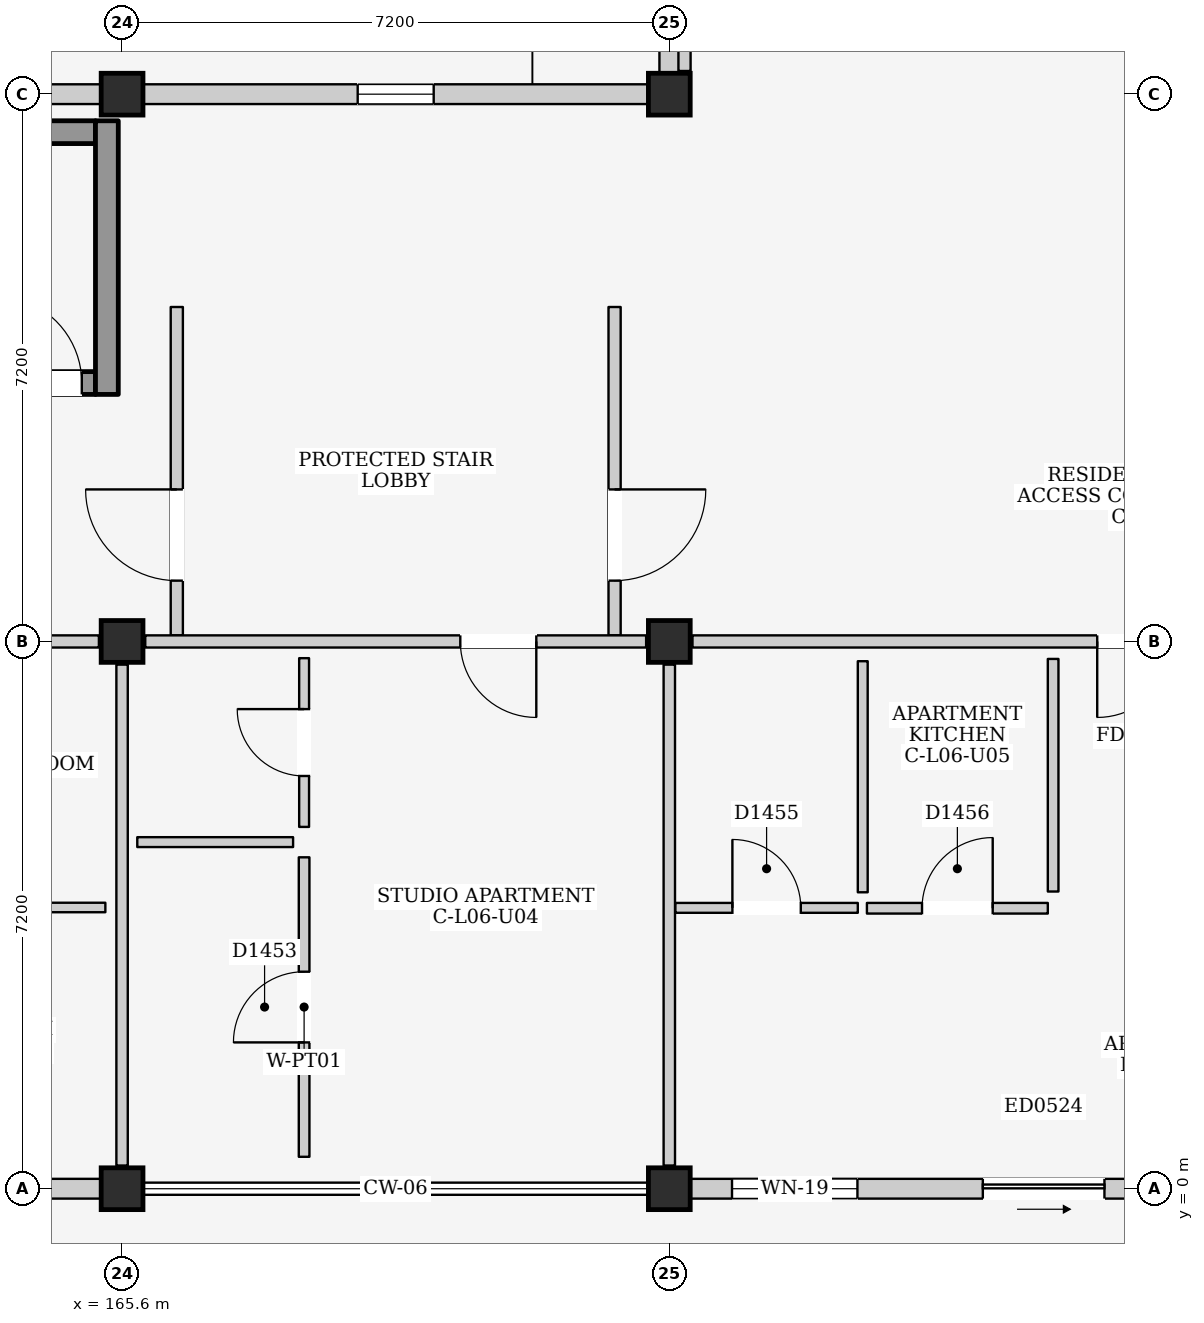
"""IFC4 building model, lengths in metres.
Left out: names, types, materials, properties, quantities, classifications, styles, units other than length and angle.
Written with IfcOpenShell. Run it as: python <this file> out.ifc"""

import sys

from ifc_helpers import new_model, si_unit, direction, frame, frame_2d, origin, origin_2d, place, context, subcontext, project, spatial, rectangle, extrude, element, fill, save


model = new_model("IFC4")
c1 = context("Model", 3, precision=1e-05, world=origin(), true_north=direction((0.0, 1.0)))
c2 = subcontext(c1, "Body", "Model", "MODEL_VIEW")
j1 = project(units=[si_unit("LENGTHUNIT", "METRE"), si_unit("PLANEANGLEUNIT", "RADIAN")], contexts=[c1])
p1 = place(None, origin())
s1 = spatial("IfcSite", under=j1, at=p1, CompositionType="ELEMENT")
p2 = place(p1, origin())
s2 = spatial("IfcBuilding", under=s1, at=p2, CompositionType="ELEMENT")
p3 = place(p2, frame((0.0, 0.0, 21.9)))
s3 = spatial("IfcBuildingStorey", under=s2, at=p3, CompositionType="ELEMENT", Elevation=21.9)
for number, where, z_axis, x_axis in (
    (1, (165.6, 0.0, 0.0), (0.0, 0.0, 1.0), (1.0, 0.0, 0.0)),
    (2, (165.6, 7.2, 0.0), (0.0, 0.0, 1.0), (1.0, 0.0, 0.0)),
    (3, (165.6, 14.4, 0.0), (0.0, 0.0, 1.0), (1.0, 0.0, 0.0)),
    (4, (172.8, 0.0, 0.0), (0.0, 0.0, 1.0), (1.0, 0.0, 0.0)),
    (5, (172.8, 7.2, 0.0), (0.0, 0.0, 1.0), (1.0, 0.0, 0.0)),
    (6, (172.8, 14.4, 0.0), (0.0, 0.0, 1.0), (1.0, 0.0, 0.0)),
):
    element("IfcColumn", number, at=place(p3, frame(where, z_axis=z_axis, x_axis=x_axis)), inside=s3, PredefinedType="COLUMN", context=c2, shape_type="SweptSolid", body=[
        extrude(rectangle(XDim=0.55, YDim=0.55, at=origin_2d()), origin(), (0.0, 0.0, 1.0), 3.2),
    ])
p4 = place(p3, frame((158.675, 0.0, 0.0), z_axis=(0.0, 0.0, 1.0), x_axis=(1.0, 0.0, 0.0)))
e7 = element("IfcWall", 7, at=p4, inside=s3, PredefinedType="ELEMENTEDWALL", context=c2, shape_type="SweptSolid", body=[
    extrude(rectangle(XDim=6.65, YDim=0.26, at=frame_2d((3.325, 0.0))), origin(), (0.0, 0.0, 1.0), 2.515),
])
p5 = place(p4, frame((3.85, 0.0, 0.0)))
e8 = element("IfcOpeningElement", 8, at=p5, cuts=e7, PredefinedType="OPENING", context=c2, shape_type="SweptSolid", body=[
    extrude(rectangle(XDim=1.4, YDim=2.1, at=frame_2d((0.7, 1.05))), frame((0.0, 0.145, 0.0), z_axis=(0.0, -1.0, 0.0), x_axis=(1.0, 0.0, 0.0)), (0.0, 0.0, 1.0), 0.29),
])
p6 = place(p4, frame((0.55, 0.0, 0.9)))
e9 = element("IfcOpeningElement", 9, at=p6, cuts=e7, PredefinedType="OPENING", context=c2, shape_type="SweptSolid", body=[
    extrude(rectangle(XDim=1.25, YDim=1.3, at=frame_2d((0.625, 0.65))), frame((0.0, 0.145, 0.0), z_axis=(0.0, -1.0, 0.0), x_axis=(1.0, 0.0, 0.0)), (0.0, 0.0, 1.0), 0.29),
])
p7 = place(p3, frame((158.675, 14.4, 0.0), z_axis=(0.0, 0.0, 1.0), x_axis=(1.0, 0.0, 0.0)))
e10 = element("IfcWall", 10, at=p7, inside=s3, PredefinedType="ELEMENTEDWALL", context=c2, shape_type="SweptSolid", body=[
    extrude(rectangle(XDim=6.65, YDim=0.26, at=frame_2d((3.325, 0.0))), origin(), (0.0, 0.0, 1.0), 2.365),
])
p8 = place(p7, frame((2.825, 0.0, 1.2)))
e11 = element("IfcOpeningElement", 11, at=p8, cuts=e10, PredefinedType="OPENING", context=c2, shape_type="SweptSolid", body=[
    extrude(rectangle(XDim=1.0, YDim=0.9, at=frame_2d((0.5, 0.45))), frame((0.0, 0.145, 0.0), z_axis=(0.0, -1.0, 0.0), x_axis=(1.0, 0.0, 0.0)), (0.0, 0.0, 1.0), 0.29),
])
p9 = place(p3, frame((165.875, 14.4, 0.0), z_axis=(0.0, 0.0, 1.0), x_axis=(1.0, 0.0, 0.0)))
e12 = element("IfcWall", 12, at=p9, inside=s3, PredefinedType="ELEMENTEDWALL", context=c2, shape_type="SweptSolid", body=[
    extrude(rectangle(XDim=6.65, YDim=0.26, at=frame_2d((3.325, 0.0))), origin(), (0.0, 0.0, 1.0), 2.365),
])
p10 = place(p9, frame((2.825, 0.0, 1.2)))
e13 = element("IfcOpeningElement", 13, at=p10, cuts=e12, PredefinedType="OPENING", context=c2, shape_type="SweptSolid", body=[
    extrude(rectangle(XDim=1.0, YDim=0.9, at=frame_2d((0.5, 0.45))), frame((0.0, 0.145, 0.0), z_axis=(0.0, -1.0, 0.0), x_axis=(1.0, 0.0, 0.0)), (0.0, 0.0, 1.0), 0.29),
])
p11 = place(p3, frame((173.075, 0.0, 0.0), z_axis=(0.0, 0.0, 1.0), x_axis=(1.0, 0.0, 0.0)))
e14 = element("IfcWall", 14, at=p11, inside=s3, PredefinedType="ELEMENTEDWALL", context=c2, shape_type="SweptSolid", body=[
    extrude(rectangle(XDim=6.65, YDim=0.26, at=frame_2d((3.325, 0.0))), origin(), (0.0, 0.0, 1.0), 2.515),
])
p12 = place(p11, frame((3.85, 0.0, 0.0)))
e15 = element("IfcOpeningElement", 15, at=p12, cuts=e14, PredefinedType="OPENING", context=c2, shape_type="SweptSolid", body=[
    extrude(rectangle(XDim=1.6, YDim=2.12, at=frame_2d((0.8, 1.06))), frame((0.0, 0.145, 0.0), z_axis=(0.0, -1.0, 0.0), x_axis=(1.0, 0.0, 0.0)), (0.0, 0.0, 1.0), 0.29),
])
p13 = place(p11, frame((0.55, 0.0, 0.9)))
e16 = element("IfcOpeningElement", 16, at=p13, cuts=e14, PredefinedType="OPENING", context=c2, shape_type="SweptSolid", body=[
    extrude(rectangle(XDim=1.65, YDim=1.35, at=frame_2d((0.825, 0.675))), frame((0.0, 0.145, 0.0), z_axis=(0.0, -1.0, 0.0), x_axis=(1.0, 0.0, 0.0)), (0.0, 0.0, 1.0), 0.29),
])
p14 = place(p3, frame((172.8, 14.675, 0.0), z_axis=(0.0, 0.0, 1.0), x_axis=(0.0, 1.0, 0.0)))
e17 = element("IfcWall", 17, at=p14, inside=s3, PredefinedType="ELEMENTEDWALL", context=c2, shape_type="SweptSolid", body=[
    extrude(rectangle(XDim=6.65, YDim=0.26, at=frame_2d((3.325, 0.0))), origin(), (0.0, 0.0, 1.0), 2.465),
])
p15 = place(p14, frame((2.5, 0.0, 0.0)))
e18 = element("IfcOpeningElement", 18, at=p15, cuts=e17, PredefinedType="OPENING", context=c2, shape_type="SweptSolid", body=[
    extrude(rectangle(XDim=1.4, YDim=2.1, at=frame_2d((0.7, 1.05))), frame((0.0, 0.145, 0.0), z_axis=(0.0, -1.0, 0.0), x_axis=(1.0, 0.0, 0.0)), (0.0, 0.0, 1.0), 0.29),
])
p16 = place(p3, frame((158.75, 10.6, 0.0), z_axis=(0.0, 0.0, 1.0), x_axis=(1.0, 0.0, 0.0)))
e19 = element("IfcWall", 19, at=p16, inside=s3, PredefinedType="SHEAR", context=c2, shape_type="SweptSolid", body=[
    extrude(rectangle(XDim=6.5, YDim=0.3, at=frame_2d((3.25, 0.0))), origin(), (0.0, 0.0, 1.0), 2.98),
])
p17 = place(p16, frame((5.17, 0.0, 0.0)))
e20 = element("IfcOpeningElement", 20, at=p17, cuts=e19, PredefinedType="OPENING", context=c2, shape_type="SweptSolid", body=[
    extrude(rectangle(XDim=1.15, YDim=2.2, at=frame_2d((0.575, 1.1))), frame((0.0, 0.165, 0.0), z_axis=(0.0, -1.0, 0.0), x_axis=(1.0, 0.0, 0.0)), (0.0, 0.0, 1.0), 0.33),
])
p18 = place(p3, frame((158.75, 13.9, 0.0), z_axis=(0.0, 0.0, 1.0), x_axis=(1.0, 0.0, 0.0)))
e21 = element("IfcWall", 21, at=p18, inside=s3, PredefinedType="SHEAR", context=c2, shape_type="SweptSolid", body=[
    extrude(rectangle(XDim=6.5, YDim=0.3, at=frame_2d((3.25, 0.0))), origin(), (0.0, 0.0, 1.0), 2.98),
])
p19 = place(p3, frame((165.4, 10.45, 0.0), z_axis=(0.0, 0.0, 1.0), x_axis=(0.0, 1.0, 0.0)))
e22 = element("IfcWall", 22, at=p19, inside=s3, PredefinedType="SHEAR", context=c2, shape_type="SweptSolid", body=[
    extrude(rectangle(XDim=3.6, YDim=0.3, at=frame_2d((1.8, 0.0))), origin(), (0.0, 0.0, 1.0), 2.98),
])
p20 = place(p3, frame((166.32, 7.28, 0.0), z_axis=(0.0, 0.0, 1.0), x_axis=(0.0, 1.0, 0.0)))
e23 = element("IfcWall", 23, at=p20, inside=s3, PredefinedType="PARTITIONING", context=c2, shape_type="SweptSolid", body=[
    extrude(rectangle(XDim=4.32, YDim=0.16, at=frame_2d((2.16, 0.0))), origin(), (0.0, 0.0, 1.0), 2.98),
])
p21 = place(p20, frame((0.72, 0.0, 0.0)))
e24 = element("IfcOpeningElement", 24, at=p21, cuts=e23, PredefinedType="OPENING", context=c2, shape_type="SweptSolid", body=[
    extrude(rectangle(XDim=1.2, YDim=2.2, at=frame_2d((0.6, 1.1))), frame((0.0, 0.095, 0.0), z_axis=(0.0, -1.0, 0.0), x_axis=(1.0, 0.0, 0.0)), (0.0, 0.0, 1.0), 0.19),
])
p22 = place(p3, frame((172.08, 7.28, 0.0), z_axis=(0.0, 0.0, 1.0), x_axis=(0.0, 1.0, 0.0)))
e25 = element("IfcWall", 25, at=p22, inside=s3, PredefinedType="PARTITIONING", context=c2, shape_type="SweptSolid", body=[
    extrude(rectangle(XDim=4.32, YDim=0.16, at=frame_2d((2.16, 0.0))), origin(), (0.0, 0.0, 1.0), 2.98),
])
p23 = place(p22, frame((0.72, 0.0, 0.0)))
e26 = element("IfcOpeningElement", 26, at=p23, cuts=e25, PredefinedType="OPENING", context=c2, shape_type="SweptSolid", body=[
    extrude(rectangle(XDim=1.2, YDim=2.2, at=frame_2d((0.6, 1.1))), frame((0.0, 0.095, 0.0), z_axis=(0.0, -1.0, 0.0), x_axis=(1.0, 0.0, 0.0)), (0.0, 0.0, 1.0), 0.19),
])
p24 = place(p3, frame((158.705, 7.2, 0.0), z_axis=(0.0, 0.0, 1.0), x_axis=(1.0, 0.0, 0.0)))
e27 = element("IfcWall", 27, at=p24, inside=s3, PredefinedType="PARTITIONING", context=c2, shape_type="SweptSolid", body=[
    extrude(rectangle(XDim=6.59, YDim=0.16, at=frame_2d((3.295, 0.0))), origin(), (0.0, 0.0, 1.0), 2.365),
])
p25 = place(p3, frame((165.6, 0.305, 0.0), z_axis=(0.0, 0.0, 1.0), x_axis=(0.0, 1.0, 0.0)))
e28 = element("IfcWall", 28, at=p25, inside=s3, PredefinedType="PARTITIONING", context=c2, shape_type="SweptSolid", body=[
    extrude(rectangle(XDim=6.59, YDim=0.15, at=frame_2d((3.295, 0.0))), origin(), (0.0, 0.0, 1.0), 2.465),
])
p26 = place(p3, frame((161.32, 3.7, 0.0), z_axis=(0.0, 0.0, 1.0), x_axis=(1.0, 0.0, 0.0)))
e29 = element("IfcWall", 29, at=p26, inside=s3, PredefinedType="PARTITIONING", context=c2, shape_type="SweptSolid", body=[
    extrude(rectangle(XDim=4.06, YDim=0.125, at=frame_2d((2.03, 0.0))), origin(), (0.0, 0.0, 1.0), 2.98),
])
p27 = place(p3, frame((165.905, 7.2, 0.0), z_axis=(0.0, 0.0, 1.0), x_axis=(1.0, 0.0, 0.0)))
e30 = element("IfcWall", 30, at=p27, inside=s3, PredefinedType="PARTITIONING", context=c2, shape_type="SweptSolid", body=[
    extrude(rectangle(XDim=6.59, YDim=0.16, at=frame_2d((3.295, 0.0))), origin(), (0.0, 0.0, 1.0), 2.365),
])
p28 = place(p27, frame((4.145, 0.0, 0.0)))
e31 = element("IfcOpeningElement", 31, at=p28, cuts=e30, PredefinedType="OPENING", context=c2, shape_type="SweptSolid", body=[
    extrude(rectangle(XDim=1.0, YDim=2.15, at=frame_2d((0.5, 1.075))), frame((0.0, 0.095, 0.0), z_axis=(0.0, -1.0, 0.0), x_axis=(1.0, 0.0, 0.0)), (0.0, 0.0, 1.0), 0.19),
])
p29 = place(p3, frame((172.8, 0.305, 0.0), z_axis=(0.0, 0.0, 1.0), x_axis=(0.0, 1.0, 0.0)))
e32 = element("IfcWall", 32, at=p29, inside=s3, PredefinedType="PARTITIONING", context=c2, shape_type="SweptSolid", body=[
    extrude(rectangle(XDim=6.59, YDim=0.15, at=frame_2d((3.295, 0.0))), origin(), (0.0, 0.0, 1.0), 2.465),
])
p30 = place(p3, frame((165.8, 4.56, 0.0), z_axis=(0.0, 0.0, 1.0), x_axis=(1.0, 0.0, 0.0)))
e33 = element("IfcWall", 33, at=p30, inside=s3, PredefinedType="PARTITIONING", context=c2, shape_type="SweptSolid", body=[
    extrude(rectangle(XDim=2.05, YDim=0.13, at=frame_2d((1.025, 0.0))), origin(), (0.0, 0.0, 1.0), 2.98),
])
p31 = place(p3, frame((167.995, 4.76, 0.0), z_axis=(0.0, 0.0, 1.0), x_axis=(0.0, 1.0, 0.0)))
e34 = element("IfcWall", 34, at=p31, inside=s3, PredefinedType="PARTITIONING", context=c2, shape_type="SweptSolid", body=[
    extrude(rectangle(XDim=2.22, YDim=0.13, at=frame_2d((1.11, 0.0))), origin(), (0.0, 0.0, 1.0), 2.98),
])
p32 = place(p31, frame((0.67, 0.0, 0.0)))
e35 = element("IfcOpeningElement", 35, at=p32, cuts=e34, PredefinedType="OPENING", context=c2, shape_type="SweptSolid", body=[
    extrude(rectangle(XDim=0.88, YDim=2.1, at=frame_2d((0.44, 1.05))), frame((0.0, 0.08, 0.0), z_axis=(0.0, -1.0, 0.0), x_axis=(1.0, 0.0, 0.0)), (0.0, 0.0, 1.0), 0.16),
])
p33 = place(p3, frame((167.995, 0.42, 0.0), z_axis=(0.0, 0.0, 1.0), x_axis=(0.0, 1.0, 0.0)))
e36 = element("IfcWall", 36, at=p33, inside=s3, PredefinedType="PARTITIONING", context=c2, shape_type="SweptSolid", body=[
    extrude(rectangle(XDim=3.94, YDim=0.14, at=frame_2d((1.97, 0.0))), origin(), (0.0, 0.0, 1.0), 2.98),
])
p34 = place(p33, frame((1.505, 0.0, 0.0)))
e37 = element("IfcOpeningElement", 37, at=p34, cuts=e36, PredefinedType="OPENING", context=c2, shape_type="SweptSolid", body=[
    extrude(rectangle(XDim=0.93, YDim=2.14, at=frame_2d((0.465, 1.07))), frame((0.0, 0.085, 0.0), z_axis=(0.0, -1.0, 0.0), x_axis=(1.0, 0.0, 0.0)), (0.0, 0.0, 1.0), 0.17),
])
p35 = place(p3, frame((173.105, 7.2, 0.0), z_axis=(0.0, 0.0, 1.0), x_axis=(1.0, 0.0, 0.0)))
e38 = element("IfcWall", 38, at=p35, inside=s3, PredefinedType="PARTITIONING", context=c2, shape_type="SweptSolid", body=[
    extrude(rectangle(XDim=6.59, YDim=0.16, at=frame_2d((3.295, 0.0))), origin(), (0.0, 0.0, 1.0), 2.365),
])
p36 = place(p35, frame((5.325, 0.0, 0.0)))
e39 = element("IfcOpeningElement", 39, at=p36, cuts=e38, PredefinedType="OPENING", context=c2, shape_type="SweptSolid", body=[
    extrude(rectangle(XDim=1.0, YDim=2.15, at=frame_2d((0.5, 1.075))), frame((0.0, 0.095, 0.0), z_axis=(0.0, -1.0, 0.0), x_axis=(1.0, 0.0, 0.0)), (0.0, 0.0, 1.0), 0.19),
])
p37 = place(p3, frame((172.88, 3.695, 0.0), z_axis=(0.0, 0.0, 1.0), x_axis=(1.0, 0.0, 0.0)))
e40 = element("IfcWall", 40, at=p37, inside=s3, PredefinedType="PARTITIONING", context=c2, shape_type="SweptSolid", body=[
    extrude(rectangle(XDim=2.4, YDim=0.13, at=frame_2d((1.2, 0.0))), origin(), (0.0, 0.0, 1.0), 2.98),
])
p38 = place(p37, frame((0.75, 0.0, 0.0)))
e41 = element("IfcOpeningElement", 41, at=p38, cuts=e40, PredefinedType="OPENING", context=c2, shape_type="SweptSolid", body=[
    extrude(rectangle(XDim=0.9, YDim=2.1, at=frame_2d((0.45, 1.05))), frame((0.0, 0.08, 0.0), z_axis=(0.0, -1.0, 0.0), x_axis=(1.0, 0.0, 0.0)), (0.0, 0.0, 1.0), 0.16),
])
p39 = place(p3, frame((175.345, 3.9, 0.0), z_axis=(0.0, 0.0, 1.0), x_axis=(0.0, 1.0, 0.0)))
e42 = element("IfcWall", 42, at=p39, inside=s3, PredefinedType="PARTITIONING", context=c2, shape_type="SweptSolid", body=[
    extrude(rectangle(XDim=3.04, YDim=0.13, at=frame_2d((1.52, 0.0))), origin(), (0.0, 0.0, 1.0), 2.98),
])
p40 = place(p3, frame((175.4, 3.69, 0.0), z_axis=(0.0, 0.0, 1.0), x_axis=(1.0, 0.0, 0.0)))
e43 = element("IfcWall", 43, at=p40, inside=s3, PredefinedType="PARTITIONING", context=c2, shape_type="SweptSolid", body=[
    extrude(rectangle(XDim=2.38, YDim=0.14, at=frame_2d((1.19, 0.0))), origin(), (0.0, 0.0, 1.0), 2.98),
])
p41 = place(p40, frame((0.725, 0.0, 0.0)))
e44 = element("IfcOpeningElement", 44, at=p41, cuts=e43, PredefinedType="OPENING", context=c2, shape_type="SweptSolid", body=[
    extrude(rectangle(XDim=0.93, YDim=2.14, at=frame_2d((0.465, 1.07))), frame((0.0, 0.085, 0.0), z_axis=(0.0, -1.0, 0.0), x_axis=(1.0, 0.0, 0.0)), (0.0, 0.0, 1.0), 0.17),
])
p42 = place(p3, frame((177.85, 3.91, 0.0), z_axis=(0.0, 0.0, 1.0), x_axis=(0.0, 1.0, 0.0)))
e45 = element("IfcWall", 45, at=p42, inside=s3, PredefinedType="PARTITIONING", context=c2, shape_type="SweptSolid", body=[
    extrude(rectangle(XDim=3.06, YDim=0.14, at=frame_2d((1.53, 0.0))), origin(), (0.0, 0.0, 1.0), 2.98),
])
p43 = place(p3, frame((173.0, 14.705, 0.0), z_axis=(0.0, 0.0, 1.0), x_axis=(0.0, 1.0, 0.0)))
e46 = element("IfcWall", 46, at=p43, inside=s3, PredefinedType="PARTITIONING", context=c2, shape_type="SweptSolid", body=[
    extrude(rectangle(XDim=6.59, YDim=0.16, at=frame_2d((3.295, 0.0))), origin(), (0.0, 0.0, 1.0), 2.98),
])
p44 = place(p43, frame((2.785, 0.0, 0.0)))
e47 = element("IfcOpeningElement", 47, at=p44, cuts=e46, PredefinedType="OPENING", context=c2, shape_type="SweptSolid", body=[
    extrude(rectangle(XDim=1.02, YDim=2.18, at=frame_2d((0.51, 1.09))), frame((0.0, 0.095, 0.0), z_axis=(0.0, -1.0, 0.0), x_axis=(1.0, 0.0, 0.0)), (0.0, 0.0, 1.0), 0.19),
])
p45 = place(p10, origin())
e48 = element("IfcWindow", 48, at=p45, inside=s3, PartitioningType="SINGLE_PANEL", PredefinedType="WINDOW", context=c2, shape_type="SweptSolid", body=[
    extrude(rectangle(XDim=1.0, YDim=0.9, at=frame_2d((0.5, 0.45))), frame((0.0, 0.03, 0.0), z_axis=(0.0, -1.0, 0.0), x_axis=(1.0, 0.0, 0.0)), (0.0, 0.0, 1.0), 0.06),
])
fill(e13, e48)
p46 = place(p12, frame((1.6, 0.0, 0.0), z_axis=(0.0, 0.0, 1.0), x_axis=(-1.0, 0.0, 0.0)))
e49 = element("IfcDoor", 49, at=p46, inside=s3, OperationType="SLIDING_TO_RIGHT", PredefinedType="DOOR", context=c2, shape_type="SweptSolid", body=[
    extrude(rectangle(XDim=1.6, YDim=2.12, at=frame_2d((0.8, 1.06))), frame((0.0, 0.025, 0.0), z_axis=(0.0, -1.0, 0.0), x_axis=(1.0, 0.0, 0.0)), (0.0, 0.0, 1.0), 0.05),
])
fill(e15, e49)
p47 = place(p13, origin())
e50 = element("IfcWindow", 50, at=p47, inside=s3, PartitioningType="DOUBLE_PANEL_VERTICAL", PredefinedType="WINDOW", context=c2, shape_type="SweptSolid", body=[
    extrude(rectangle(XDim=1.65, YDim=1.35, at=frame_2d((0.825, 0.675))), frame((0.0, 0.03, 0.0), z_axis=(0.0, -1.0, 0.0), x_axis=(1.0, 0.0, 0.0)), (0.0, 0.0, 1.0), 0.06),
])
fill(e16, e50)
p48 = place(p17, origin())
e51 = element("IfcDoor", 51, at=p48, inside=s3, OperationType="SINGLE_SWING_LEFT", PredefinedType="DOOR", context=c2, shape_type="SweptSolid", body=[
    extrude(rectangle(XDim=1.15, YDim=2.2, at=frame_2d((0.575, 1.1))), frame((0.0, 0.025, 0.0), z_axis=(0.0, -1.0, 0.0), x_axis=(1.0, 0.0, 0.0)), (0.0, 0.0, 1.0), 0.05),
])
fill(e20, e51)
p49 = place(p21, origin())
e52 = element("IfcDoor", 52, at=p49, inside=s3, OperationType="SINGLE_SWING_RIGHT", PredefinedType="DOOR", context=c2, shape_type="SweptSolid", body=[
    extrude(rectangle(XDim=1.2, YDim=2.2, at=frame_2d((0.6, 1.1))), frame((0.0, 0.025, 0.0), z_axis=(0.0, -1.0, 0.0), x_axis=(1.0, 0.0, 0.0)), (0.0, 0.0, 1.0), 0.05),
])
fill(e24, e52)
p50 = place(p23, frame((1.2, 0.0, 0.0), z_axis=(0.0, 0.0, 1.0), x_axis=(-1.0, 0.0, 0.0)))
e53 = element("IfcDoor", 53, at=p50, inside=s3, OperationType="SINGLE_SWING_LEFT", PredefinedType="DOOR", context=c2, shape_type="SweptSolid", body=[
    extrude(rectangle(XDim=1.2, YDim=2.2, at=frame_2d((0.6, 1.1))), frame((0.0, 0.025, 0.0), z_axis=(0.0, -1.0, 0.0), x_axis=(1.0, 0.0, 0.0)), (0.0, 0.0, 1.0), 0.05),
])
fill(e26, e53)
p51 = place(p28, frame((1.0, 0.0, 0.0), z_axis=(0.0, 0.0, 1.0), x_axis=(-1.0, 0.0, 0.0)))
e54 = element("IfcDoor", 54, at=p51, inside=s3, OperationType="SINGLE_SWING_LEFT", PredefinedType="DOOR", context=c2, shape_type="SweptSolid", body=[
    extrude(rectangle(XDim=1.0, YDim=2.15, at=frame_2d((0.5, 1.075))), frame((0.0, 0.025, 0.0), z_axis=(0.0, -1.0, 0.0), x_axis=(1.0, 0.0, 0.0)), (0.0, 0.0, 1.0), 0.05),
])
fill(e31, e54)
p52 = place(p32, origin())
e55 = element("IfcDoor", 55, at=p52, inside=s3, OperationType="SINGLE_SWING_RIGHT", PredefinedType="DOOR", context=c2, shape_type="SweptSolid", body=[
    extrude(rectangle(XDim=0.88, YDim=2.1, at=frame_2d((0.44, 1.05))), frame((0.0, 0.025, 0.0), z_axis=(0.0, -1.0, 0.0), x_axis=(1.0, 0.0, 0.0)), (0.0, 0.0, 1.0), 0.05),
])
fill(e35, e55)
p53 = place(p34, origin())
e56 = element("IfcDoor", 56, at=p53, inside=s3, OperationType="SINGLE_SWING_LEFT", PredefinedType="DOOR", context=c2, shape_type="SweptSolid", body=[
    extrude(rectangle(XDim=0.93, YDim=2.14, at=frame_2d((0.465, 1.07))), frame((0.0, 0.025, 0.0), z_axis=(0.0, -1.0, 0.0), x_axis=(1.0, 0.0, 0.0)), (0.0, 0.0, 1.0), 0.05),
])
fill(e37, e56)
p54 = place(p36, frame((1.0, 0.0, 0.0), z_axis=(0.0, 0.0, 1.0), x_axis=(-1.0, 0.0, 0.0)))
e57 = element("IfcDoor", 57, at=p54, inside=s3, OperationType="SINGLE_SWING_RIGHT", PredefinedType="DOOR", context=c2, shape_type="SweptSolid", body=[
    extrude(rectangle(XDim=1.0, YDim=2.15, at=frame_2d((0.5, 1.075))), frame((0.0, 0.025, 0.0), z_axis=(0.0, -1.0, 0.0), x_axis=(1.0, 0.0, 0.0)), (0.0, 0.0, 1.0), 0.05),
])
fill(e39, e57)
p55 = place(p38, origin())
e58 = element("IfcDoor", 58, at=p55, inside=s3, OperationType="SINGLE_SWING_LEFT", PredefinedType="DOOR", context=c2, shape_type="SweptSolid", body=[
    extrude(rectangle(XDim=0.9, YDim=2.1, at=frame_2d((0.45, 1.05))), frame((0.0, 0.025, 0.0), z_axis=(0.0, -1.0, 0.0), x_axis=(1.0, 0.0, 0.0)), (0.0, 0.0, 1.0), 0.05),
])
fill(e41, e58)
p56 = place(p41, origin())
e59 = element("IfcDoor", 59, at=p56, inside=s3, OperationType="SINGLE_SWING_RIGHT", PredefinedType="DOOR", context=c2, shape_type="SweptSolid", body=[
    extrude(rectangle(XDim=0.93, YDim=2.14, at=frame_2d((0.465, 1.07))), frame((0.0, 0.025, 0.0), z_axis=(0.0, -1.0, 0.0), x_axis=(1.0, 0.0, 0.0)), (0.0, 0.0, 1.0), 0.05),
])
fill(e44, e59)
save(model, sys.argv[1])
